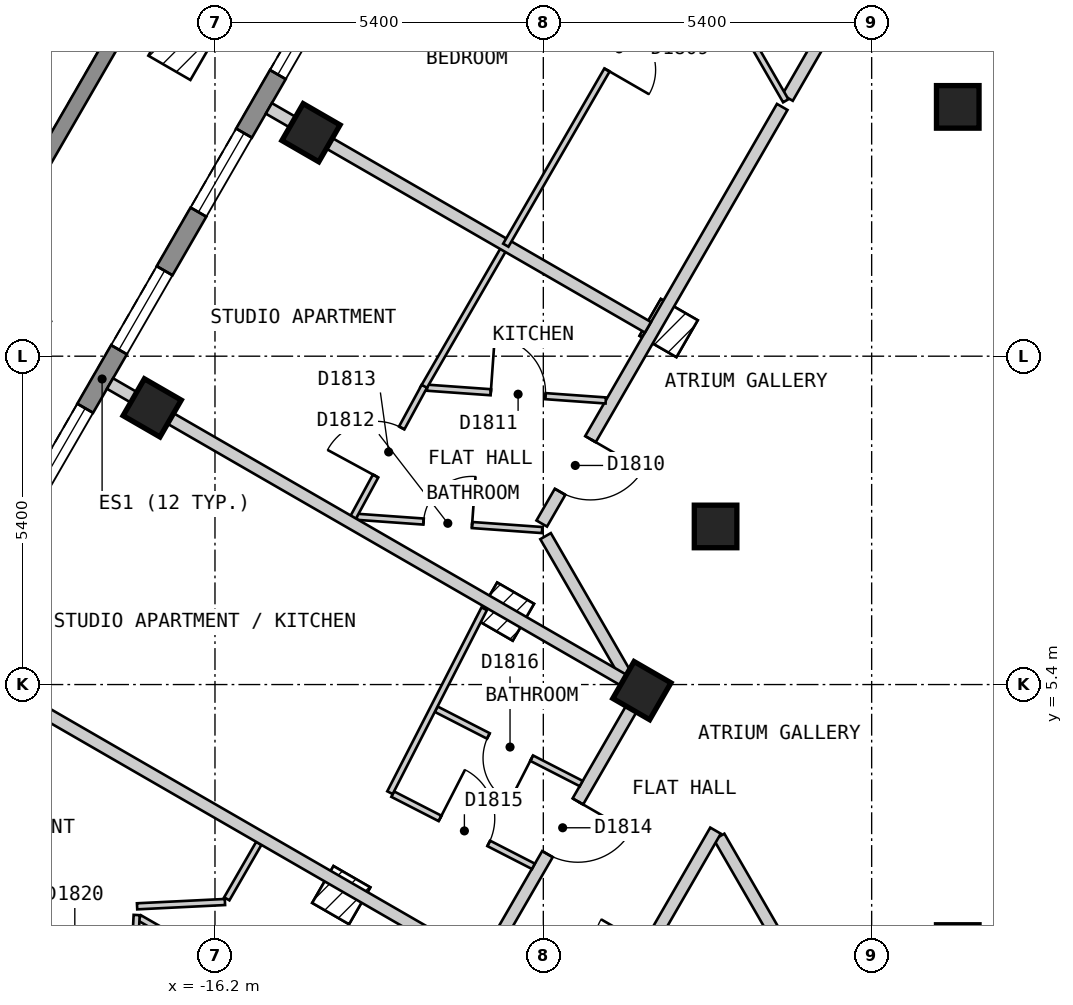
"""IFC4 building model, lengths in metres.
Left out: names, types, materials, properties, quantities, classifications, styles, units other than length and angle.
Written with IfcOpenShell. Run it as: python <this file> out.ifc"""

import sys

from ifc_helpers import new_model, si_unit, direction, frame, frame_2d, origin, origin_2d, place, context, subcontext, project, spatial, polyline, rectangle, outline, extrude, element, fill, save


model = new_model("IFC4")
c1 = context("Model", 3, precision=1e-05, world=origin(), true_north=direction((0.0, 1.0)))
c2 = subcontext(c1, "Body", "Model", "MODEL_VIEW")
j1 = project(units=[si_unit("LENGTHUNIT", "METRE"), si_unit("PLANEANGLEUNIT", "RADIAN")], contexts=[c1])
p1 = place(None, origin())
s1 = spatial("IfcSite", under=j1, at=p1, CompositionType="ELEMENT")
p2 = place(p1, origin())
s2 = spatial("IfcBuilding", under=s1, at=p2, CompositionType="ELEMENT")
p3 = place(p2, frame((0.0, 0.0, 202.8)))
s3 = spatial("IfcBuildingStorey", under=s2, at=p3, CompositionType="ELEMENT", Elevation=202.8)
for number, where, z_axis, x_axis in (
    (1, (-14.621, 14.475, 0.0), (0.0, 0.0, 1.0), (-0.5, -0.866, 0.0)),
    (2, (-17.233, 9.95, 0.0), (0.0, 0.0, 1.0), (-0.5, -0.866, 0.0)),
    (3, (-3.984, 14.9, 0.0), (0.0, 0.0, 1.0), (1.0, 0.0, 0.0)),
    (4, (-7.967, 8.0, 0.0), (0.0, 0.0, 1.0), (1.0, 0.0, 0.0)),
    (5, (-9.179, 5.3, 0.0), (0.0, 0.0, 1.0), (-0.5, -0.866, 0.0)),
):
    element("IfcColumn", number, at=place(p3, frame(where, z_axis=z_axis, x_axis=x_axis)), inside=s3, PredefinedType="COLUMN", context=c2, shape_type="SweptSolid", body=[
        extrude(rectangle(XDim=0.7, YDim=0.7, at=origin_2d()), origin(), (0.0, 0.0, 1.0), 3.0),
    ])
p4 = place(p3, frame((-12.514, 20.025, 0.0), z_axis=(0.0, 0.0, 1.0), x_axis=(-0.500003656944, -0.866023292436, 0.0)))
e6 = element("IfcWall", 6, at=p4, inside=s3, PredefinedType="SOLIDWALL", context=c2, shape_type="SweptSolid", body=[
    extrude(outline(polyline([(0.0, -0.15), (22.17, -0.15), (22.09, 0.15), (0.08, 0.15), (0.0, -0.15)])), origin(), (0.0, 0.0, 1.0), 2.7),
])
p5 = place(p4, frame((1.191, 0.0, 0.15)))
e7 = element("IfcOpeningElement", 7, at=p5, cuts=e6, PredefinedType="OPENING", context=c2, shape_type="SweptSolid", body=[
    extrude(rectangle(XDim=1.5, YDim=2.1, at=frame_2d((0.75, 1.05))), frame((0.0, 0.16, 0.0), z_axis=(0.0, -1.0, 0.0), x_axis=(1.0, 0.0, 0.0)), (0.0, 0.0, 1.0), 0.32),
])
p6 = place(p4, frame((3.804, 0.0, 0.15)))
e8 = element("IfcOpeningElement", 8, at=p6, cuts=e6, PredefinedType="OPENING", context=c2, shape_type="SweptSolid", body=[
    extrude(rectangle(XDim=1.5, YDim=2.1, at=frame_2d((0.75, 1.05))), frame((0.0, 0.16, 0.0), z_axis=(0.0, -1.0, 0.0), x_axis=(1.0, 0.0, 0.0)), (0.0, 0.0, 1.0), 0.32),
])
p7 = place(p4, frame((6.416, 0.0, 0.15)))
e9 = element("IfcOpeningElement", 9, at=p7, cuts=e6, PredefinedType="OPENING", context=c2, shape_type="SweptSolid", body=[
    extrude(rectangle(XDim=1.5, YDim=2.1, at=frame_2d((0.75, 1.05))), frame((0.0, 0.16, 0.0), z_axis=(0.0, -1.0, 0.0), x_axis=(1.0, 0.0, 0.0)), (0.0, 0.0, 1.0), 0.32),
])
p8 = place(p4, frame((9.029, 0.0, 0.15)))
e10 = element("IfcOpeningElement", 10, at=p8, cuts=e6, PredefinedType="OPENING", context=c2, shape_type="SweptSolid", body=[
    extrude(rectangle(XDim=1.5, YDim=2.1, at=frame_2d((0.75, 1.05))), frame((0.0, 0.16, 0.0), z_axis=(0.0, -1.0, 0.0), x_axis=(1.0, 0.0, 0.0)), (0.0, 0.0, 1.0), 0.32),
])
p9 = place(p4, frame((11.641, 0.0, 0.15)))
e11 = element("IfcOpeningElement", 11, at=p9, cuts=e6, PredefinedType="OPENING", context=c2, shape_type="SweptSolid", body=[
    extrude(rectangle(XDim=1.5, YDim=2.1, at=frame_2d((0.75, 1.05))), frame((0.0, 0.16, 0.0), z_axis=(0.0, -1.0, 0.0), x_axis=(1.0, 0.0, 0.0)), (0.0, 0.0, 1.0), 0.32),
])
p10 = place(p4, frame((14.254, 0.0, 0.15)))
e12 = element("IfcOpeningElement", 12, at=p10, cuts=e6, PredefinedType="OPENING", context=c2, shape_type="SweptSolid", body=[
    extrude(rectangle(XDim=1.5, YDim=2.1, at=frame_2d((0.75, 1.05))), frame((0.0, 0.16, 0.0), z_axis=(0.0, -1.0, 0.0), x_axis=(1.0, 0.0, 0.0)), (0.0, 0.0, 1.0), 0.32),
])
p11 = place(p4, frame((16.866, 0.0, 0.15)))
e13 = element("IfcOpeningElement", 13, at=p11, cuts=e6, PredefinedType="OPENING", context=c2, shape_type="SweptSolid", body=[
    extrude(rectangle(XDim=1.5, YDim=2.1, at=frame_2d((0.75, 1.05))), frame((0.0, 0.16, 0.0), z_axis=(0.0, -1.0, 0.0), x_axis=(1.0, 0.0, 0.0)), (0.0, 0.0, 1.0), 0.32),
])
p12 = place(p4, frame((19.479, 0.0, 0.15)))
e14 = element("IfcOpeningElement", 14, at=p12, cuts=e6, PredefinedType="OPENING", context=c2, shape_type="SweptSolid", body=[
    extrude(rectangle(XDim=1.5, YDim=2.1, at=frame_2d((0.75, 1.05))), frame((0.0, 0.16, 0.0), z_axis=(0.0, -1.0, 0.0), x_axis=(1.0, 0.0, 0.0)), (0.0, 0.0, 1.0), 0.32),
])
p13 = place(p3, frame((-26.046, 1.838, 0.0), z_axis=(0.0, 0.0, 1.0), x_axis=(0.500061067893, 0.865990143349, 0.0)))
e15 = element("IfcWall", 15, at=p13, inside=s3, PredefinedType="PARAPET", context=c2, shape_type="SweptSolid", body=[
    extrude(outline(polyline([(0.067, -0.125), (22.796, -0.125), (22.863, 0.125), (0.0, 0.125), (0.067, -0.125)])), origin(), (0.0, 0.0, 1.0), 1.6),
])
p14 = place(p3, frame((-10.763, 7.841, 0.0), z_axis=(0.0, 0.0, 1.0), x_axis=(0.499980792466, -0.866036492975, 0.0)))
e16 = element("IfcWall", 16, at=p14, inside=s3, PredefinedType="PARTITIONING", context=c2, shape_type="SweptSolid", body=[
    extrude(rectangle(XDim=2.618, YDim=0.2, at=frame_2d((1.309, 0.0))), origin(), (0.0, 0.0, 1.0), 2.7),
])
p15 = place(p3, frame((-7.909, 2.898, 0.0), z_axis=(0.0, 0.0, 1.0), x_axis=(0.50019444547, -0.865913111531, 0.0)))
e17 = element("IfcWall", 17, at=p15, inside=s3, PredefinedType="PARTITIONING", context=c2, shape_type="SweptSolid", body=[
    extrude(rectangle(XDim=1.761, YDim=0.2, at=frame_2d((0.88, 0.0))), origin(), (0.0, 0.0, 1.0), 2.7),
])
p16 = place(p3, frame((-10.623, -1.6, 0.0), z_axis=(0.0, 0.0, 1.0), x_axis=(0.500040865889, 0.866001808567, 0.0)))
e18 = element("IfcWall", 18, at=p16, inside=s3, PredefinedType="PARTITIONING", context=c2, shape_type="SweptSolid", body=[
    extrude(rectangle(XDim=5.31, YDim=0.2, at=frame_2d((2.655, 0.0))), origin(), (0.0, 0.0, 1.0), 2.7),
])
p17 = place(p16, frame((2.205, 0.0, 0.0)))
e19 = element("IfcOpeningElement", 19, at=p17, cuts=e18, PredefinedType="OPENING", context=c2, shape_type="SweptSolid", body=[
    extrude(rectangle(XDim=0.9, YDim=2.1, at=frame_2d((0.45, 1.05))), frame((0.0, 0.11, 0.0), z_axis=(0.0, -1.0, 0.0), x_axis=(1.0, 0.0, 0.0)), (0.0, 0.0, 1.0), 0.22),
])
p18 = place(p3, frame((-13.106, -1.5, 0.0), z_axis=(0.0, 0.0, 1.0), x_axis=(0.500025705601, 0.86601056214, 0.0)))
e20 = element("IfcWall", 20, at=p18, inside=s3, PredefinedType="PARTITIONING", context=c2, shape_type="SweptSolid", body=[
    extrude(rectangle(XDim=7.735, YDim=0.2, at=frame_2d((3.868, 0.0))), origin(), (0.0, 0.0, 1.0), 2.7),
])
p19 = place(p18, frame((4.748, 0.0, 0.0)))
e21 = element("IfcOpeningElement", 21, at=p19, cuts=e20, PredefinedType="OPENING", context=c2, shape_type="SweptSolid", body=[
    extrude(rectangle(XDim=1.0, YDim=2.1, at=frame_2d((0.5, 1.05))), frame((0.0, 0.11, 0.0), z_axis=(0.0, -1.0, 0.0), x_axis=(1.0, 0.0, 0.0)), (0.0, 0.0, 1.0), 0.22),
])
p20 = place(p18, frame((0.03, 0.0, 0.0)))
e22 = element("IfcOpeningElement", 22, at=p20, cuts=e20, PredefinedType="OPENING", context=c2, shape_type="SweptSolid", body=[
    extrude(rectangle(XDim=0.8, YDim=2.1, at=frame_2d((0.4, 1.05))), frame((0.0, 0.11, 0.0), z_axis=(0.0, -1.0, 0.0), x_axis=(1.0, 0.0, 0.0)), (0.0, 0.0, 1.0), 0.22),
])
p21 = place(p3, frame((-10.826, 8.048, 0.0), z_axis=(0.0, 0.0, 1.0), x_axis=(0.499953104851, 0.866052477019, 0.0)))
e23 = element("IfcWall", 23, at=p21, inside=s3, PredefinedType="PARTITIONING", context=c2, shape_type="SweptSolid", body=[
    extrude(rectangle(XDim=7.91, YDim=0.2, at=frame_2d((3.955, 0.0))), origin(), (0.0, 0.0, 1.0), 2.7),
])
p22 = place(p21, frame((0.603, 0.0, 0.0)))
e24 = element("IfcOpeningElement", 24, at=p22, cuts=e23, PredefinedType="OPENING", context=c2, shape_type="SweptSolid", body=[
    extrude(rectangle(XDim=1.0, YDim=2.1, at=frame_2d((0.5, 1.05))), frame((0.0, 0.11, 0.0), z_axis=(0.0, -1.0, 0.0), x_axis=(1.0, 0.0, 0.0)), (0.0, 0.0, 1.0), 0.22),
])
p23 = place(p3, frame((-6.784, 15.05, 0.0), z_axis=(0.0, 0.0, 1.0), x_axis=(0.500067724834, 0.865986299303, 0.0)))
e25 = element("IfcWall", 25, at=p23, inside=s3, PredefinedType="PARTITIONING", context=c2, shape_type="SweptSolid", body=[
    extrude(rectangle(XDim=2.713, YDim=0.2, at=frame_2d((1.357, 0.0))), origin(), (0.0, 0.0, 1.0), 2.7),
])
p24 = place(p3, frame((-7.628, 16.412, 0.0), z_axis=(0.0, 0.0, 1.0), x_axis=(0.499843439945, -0.866115774908, 0.0)))
e26 = element("IfcWall", 26, at=p24, inside=s3, PredefinedType="PARTITIONING", context=c2, shape_type="SweptSolid", body=[
    extrude(rectangle(XDim=1.63, YDim=0.1, at=frame_2d((0.815, 0.0))), origin(), (0.0, 0.0, 1.0), 2.7),
])
p25 = place(p3, frame((-12.562, 4.995, 0.0), z_axis=(0.0, 0.0, 1.0), x_axis=(0.889807979554, -0.456335139478, 0.0)))
e27 = element("IfcWall", 27, at=p25, inside=s3, PredefinedType="PARTITIONING", context=c2, shape_type="SweptSolid", body=[
    extrude(rectangle(XDim=2.68, YDim=0.1, at=frame_2d((1.34, 0.0))), origin(), (0.0, 0.0, 1.0), 2.7),
])
p26 = place(p25, frame((0.965, 0.0, 0.0)))
e28 = element("IfcOpeningElement", 28, at=p26, cuts=e27, PredefinedType="OPENING", context=c2, shape_type="SweptSolid", body=[
    extrude(rectangle(XDim=0.8, YDim=2.1, at=frame_2d((0.4, 1.05))), frame((0.0, 0.06, 0.0), z_axis=(0.0, -1.0, 0.0), x_axis=(1.0, 0.0, 0.0)), (0.0, 0.0, 1.0), 0.12),
])
p27 = place(p3, frame((-13.277, 3.598, 0.0), z_axis=(0.0, 0.0, 1.0), x_axis=(0.889780322893, -0.456389063182, 0.0)))
e29 = element("IfcWall", 29, at=p27, inside=s3, PredefinedType="PARTITIONING", context=c2, shape_type="SweptSolid", body=[
    extrude(rectangle(XDim=2.601, YDim=0.1, at=frame_2d((1.3, 0.0))), origin(), (0.0, 0.0, 1.0), 2.7),
])
p28 = place(p27, frame((0.875, 0.0, 0.0)))
e30 = element("IfcOpeningElement", 30, at=p28, cuts=e29, PredefinedType="OPENING", context=c2, shape_type="SweptSolid", body=[
    extrude(rectangle(XDim=0.9, YDim=2.1, at=frame_2d((0.45, 1.05))), frame((0.0, 0.06, 0.0), z_axis=(0.0, -1.0, 0.0), x_axis=(1.0, 0.0, 0.0)), (0.0, 0.0, 1.0), 0.12),
])
p29 = place(p3, frame((-17.441, 1.562, 0.0), z_axis=(0.0, 0.0, 1.0), x_axis=(0.867419073464, -0.497578286293, 0.0)))
e31 = element("IfcWall", 31, at=p29, inside=s3, PredefinedType="PARTITIONING", context=c2, shape_type="SweptSolid", body=[
    extrude(rectangle(XDim=5.185, YDim=0.1, at=frame_2d((2.593, 0.0))), origin(), (0.0, 0.0, 1.0), 2.7),
])
p30 = place(p29, frame((2.165, 0.0, 0.0)))
e32 = element("IfcOpeningElement", 32, at=p30, cuts=e31, PredefinedType="OPENING", context=c2, shape_type="SweptSolid", body=[
    extrude(rectangle(XDim=0.9, YDim=2.1, at=frame_2d((0.45, 1.05))), frame((0.0, 0.06, 0.0), z_axis=(0.0, -1.0, 0.0), x_axis=(1.0, 0.0, 0.0)), (0.0, 0.0, 1.0), 0.12),
])
p31 = place(p3, frame((-13.866, 8.159, 0.0), z_axis=(0.0, 0.0, 1.0), x_axis=(0.9974481372, -0.071394772886, 0.0)))
e33 = element("IfcWall", 33, at=p31, inside=s3, PredefinedType="PARTITIONING", context=c2, shape_type="SweptSolid", body=[
    extrude(rectangle(XDim=3.054, YDim=0.1, at=frame_2d((1.527, 0.0))), origin(), (0.0, 0.0, 1.0), 2.7),
])
p32 = place(p31, frame((1.099, 0.0, 0.0)))
e34 = element("IfcOpeningElement", 34, at=p32, cuts=e33, PredefinedType="OPENING", context=c2, shape_type="SweptSolid", body=[
    extrude(rectangle(XDim=0.8, YDim=2.1, at=frame_2d((0.4, 1.05))), frame((0.0, 0.06, 0.0), z_axis=(0.0, -1.0, 0.0), x_axis=(1.0, 0.0, 0.0)), (0.0, 0.0, 1.0), 0.12),
])
p33 = place(p3, frame((-12.712, 10.282, 0.0), z_axis=(0.0, 0.0, 1.0), x_axis=(0.997457858552, -0.071258826911, 0.0)))
e35 = element("IfcWall", 35, at=p33, inside=s3, PredefinedType="PARTITIONING", context=c2, shape_type="SweptSolid", body=[
    extrude(rectangle(XDim=2.947, YDim=0.1, at=frame_2d((1.473, 0.0))), origin(), (0.0, 0.0, 1.0), 2.7),
])
p34 = place(p33, frame((1.051, 0.0, 0.0)))
e36 = element("IfcOpeningElement", 36, at=p34, cuts=e35, PredefinedType="OPENING", context=c2, shape_type="SweptSolid", body=[
    extrude(rectangle(XDim=0.9, YDim=2.1, at=frame_2d((0.45, 1.05))), frame((0.0, 0.06, 0.0), z_axis=(0.0, -1.0, 0.0), x_axis=(1.0, 0.0, 0.0)), (0.0, 0.0, 1.0), 0.12),
])
p35 = place(p3, frame((-16.006, 1.876, 0.0), z_axis=(0.0, 0.0, 1.0), x_axis=(0.499949632511, 0.866054481515, 0.0)))
e37 = element("IfcWall", 37, at=p35, inside=s3, PredefinedType="PARTITIONING", context=c2, shape_type="SweptSolid", body=[
    extrude(rectangle(XDim=1.054, YDim=0.1, at=frame_2d((0.527, 0.0))), origin(), (0.0, 0.0, 1.0), 2.7),
])
p36 = place(p3, frame((-12.778, 10.268, 0.0), z_axis=(0.0, 0.0, 1.0), x_axis=(0.500084799062, 0.865976439487, 0.0)))
e38 = element("IfcWall", 38, at=p36, inside=s3, PredefinedType="PARTITIONING", context=c2, shape_type="SweptSolid", body=[
    extrude(rectangle(XDim=2.722, YDim=0.1, at=frame_2d((1.361, 0.0))), origin(), (0.0, 0.0, 1.0), 2.7),
])
p37 = place(p3, frame((-13.93, 8.145, 0.0), z_axis=(0.0, 0.0, 1.0), x_axis=(0.477194887681, 0.878797496111, 0.0)))
e39 = element("IfcWall", 39, at=p37, inside=s3, PredefinedType="PARTITIONING", context=c2, shape_type="SweptSolid", body=[
    extrude(rectangle(XDim=2.458, YDim=0.1, at=frame_2d((1.229, 0.0))), origin(), (0.0, 0.0, 1.0), 2.7),
])
p38 = place(p37, frame((0.779, 0.0, 0.0)))
e40 = element("IfcOpeningElement", 40, at=p38, cuts=e39, PredefinedType="OPENING", context=c2, shape_type="SweptSolid", body=[
    extrude(rectangle(XDim=0.9, YDim=2.1, at=frame_2d((0.45, 1.05))), frame((0.0, 0.06, 0.0), z_axis=(0.0, -1.0, 0.0), x_axis=(1.0, 0.0, 0.0)), (0.0, 0.0, 1.0), 0.12),
])
p39 = place(p3, frame((-13.322, 3.622, 0.0), z_axis=(0.0, 0.0, 1.0), x_axis=(0.456157649007, 0.889898982611, 0.0)))
e41 = element("IfcWall", 41, at=p39, inside=s3, PredefinedType="PARTITIONING", context=c2, shape_type="SweptSolid", body=[
    extrude(rectangle(XDim=3.398, YDim=0.1, at=frame_2d((1.699, 0.0))), origin(), (0.0, 0.0, 1.0), 2.7),
])
p40 = place(p3, frame((-17.503, 1.307, 0.0), z_axis=(0.0, 0.0, 1.0), x_axis=(0.049055201451, 0.99879606888, 0.0)))
e42 = element("IfcWall", 42, at=p40, inside=s3, PredefinedType="PARTITIONING", context=c2, shape_type="SweptSolid", body=[
    extrude(rectangle(XDim=0.303, YDim=0.1, at=frame_2d((0.152, 0.0))), origin(), (0.0, 0.0, 1.0), 2.7),
])
p41 = place(p3, frame((-17.481, 1.753, 0.0), z_axis=(0.0, 0.0, 1.0), x_axis=(0.998793651238, 0.049104401505, 0.0)))
e43 = element("IfcWall", 43, at=p41, inside=s3, PredefinedType="PARTITIONING", context=c2, shape_type="SweptSolid", body=[
    extrude(rectangle(XDim=1.447, YDim=0.1, at=frame_2d((0.723, 0.0))), origin(), (0.0, 0.0, 1.0), 2.7),
])
p42 = place(p3, frame((-20.539, 5.825, 0.0), z_axis=(0.0, 0.0, 1.0), x_axis=(0.866028187226, -0.499995178908, 0.0)))
e44 = element("IfcWall", 44, at=p42, inside=s3, PredefinedType="PARTITIONING", context=c2, shape_type="SweptSolid", body=[
    extrude(rectangle(XDim=9.996, YDim=0.2, at=frame_2d((4.998, 0.0))), origin(), (0.0, 0.0, 1.0), 2.7),
])
p43 = place(p3, frame((-17.926, 10.35, 0.0), z_axis=(0.0, 0.0, 1.0), x_axis=(0.866018411306, -0.500012111133, 0.0)))
e45 = element("IfcWall", 45, at=p43, inside=s3, PredefinedType="PARTITIONING", context=c2, shape_type="SweptSolid", body=[
    extrude(rectangle(XDim=9.898, YDim=0.2, at=frame_2d((4.949, 0.0))), origin(), (0.0, 0.0, 1.0), 2.7),
])
p44 = place(p3, frame((-15.314, 14.875, 0.0), z_axis=(0.0, 0.0, 1.0), x_axis=(0.866001485781, -0.500041424909, 0.0)))
e46 = element("IfcWall", 46, at=p44, inside=s3, PredefinedType="PARTITIONING", context=c2, shape_type="SweptSolid", body=[
    extrude(rectangle(XDim=7.2, YDim=0.2, at=frame_2d((3.6, 0.0))), origin(), (0.0, 0.0, 1.0), 2.7),
])
p45 = place(p3, frame((-11.417, 12.625, 0.0), z_axis=(0.0, 0.0, 1.0), x_axis=(0.500007885066, 0.866020851292, 0.0)))
e47 = element("IfcWall", 47, at=p45, inside=s3, PredefinedType="PARTITIONING", context=c2, shape_type="SweptSolid", body=[
    extrude(rectangle(XDim=7.33, YDim=0.1, at=frame_2d((3.665, 0.0))), origin(), (0.0, 0.0, 1.0), 2.7),
])
p46 = place(p45, frame((3.328, 0.0, 0.0)))
e48 = element("IfcOpeningElement", 48, at=p46, cuts=e47, PredefinedType="OPENING", context=c2, shape_type="SweptSolid", body=[
    extrude(rectangle(XDim=0.8, YDim=2.1, at=frame_2d((0.4, 1.05))), frame((0.0, 0.06, 0.0), z_axis=(0.0, -1.0, 0.0), x_axis=(1.0, 0.0, 0.0)), (0.0, 0.0, 1.0), 0.12),
])
p47 = place(p6, origin())
e49 = element("IfcWindow", 49, at=p47, inside=s3, PartitioningType="SINGLE_PANEL", PredefinedType="WINDOW", context=c2, shape_type="SweptSolid", body=[
    extrude(rectangle(XDim=1.5, YDim=2.1, at=frame_2d((0.75, 1.05))), frame((0.0, 0.03, 0.0), z_axis=(0.0, -1.0, 0.0), x_axis=(1.0, 0.0, 0.0)), (0.0, 0.0, 1.0), 0.06),
])
fill(e8, e49)
p48 = place(p7, origin())
e50 = element("IfcWindow", 50, at=p48, inside=s3, PartitioningType="SINGLE_PANEL", PredefinedType="WINDOW", context=c2, shape_type="SweptSolid", body=[
    extrude(rectangle(XDim=1.5, YDim=2.1, at=frame_2d((0.75, 1.05))), frame((0.0, 0.03, 0.0), z_axis=(0.0, -1.0, 0.0), x_axis=(1.0, 0.0, 0.0)), (0.0, 0.0, 1.0), 0.06),
])
fill(e9, e50)
p49 = place(p8, origin())
e51 = element("IfcWindow", 51, at=p49, inside=s3, PartitioningType="SINGLE_PANEL", PredefinedType="WINDOW", context=c2, shape_type="SweptSolid", body=[
    extrude(rectangle(XDim=1.5, YDim=2.1, at=frame_2d((0.75, 1.05))), frame((0.0, 0.03, 0.0), z_axis=(0.0, -1.0, 0.0), x_axis=(1.0, 0.0, 0.0)), (0.0, 0.0, 1.0), 0.06),
])
fill(e10, e51)
p50 = place(p9, origin())
e52 = element("IfcWindow", 52, at=p50, inside=s3, PartitioningType="SINGLE_PANEL", PredefinedType="WINDOW", context=c2, shape_type="SweptSolid", body=[
    extrude(rectangle(XDim=1.5, YDim=2.1, at=frame_2d((0.75, 1.05))), frame((0.0, 0.03, 0.0), z_axis=(0.0, -1.0, 0.0), x_axis=(1.0, 0.0, 0.0)), (0.0, 0.0, 1.0), 0.06),
])
fill(e11, e52)
p51 = place(p46, origin())
e53 = element("IfcDoor", 53, at=p51, inside=s3, OperationType="SINGLE_SWING_LEFT", PredefinedType="DOOR", context=c2, shape_type="SweptSolid", body=[
    extrude(rectangle(XDim=0.8, YDim=2.1, at=frame_2d((0.4, 1.05))), frame((0.0, 0.025, 0.0), z_axis=(0.0, -1.0, 0.0), x_axis=(1.0, 0.0, 0.0)), (0.0, 0.0, 1.0), 0.05),
])
fill(e48, e53)
p52 = place(p22, origin())
e54 = element("IfcDoor", 54, at=p52, inside=s3, OperationType="SINGLE_SWING_RIGHT", PredefinedType="DOOR", context=c2, shape_type="SweptSolid", body=[
    extrude(rectangle(XDim=1.0, YDim=2.1, at=frame_2d((0.5, 1.05))), frame((0.0, 0.025, 0.0), z_axis=(0.0, -1.0, 0.0), x_axis=(1.0, 0.0, 0.0)), (0.0, 0.0, 1.0), 0.05),
])
fill(e24, e54)
p53 = place(p34, origin())
e55 = element("IfcDoor", 55, at=p53, inside=s3, OperationType="SINGLE_SWING_LEFT", PredefinedType="DOOR", context=c2, shape_type="SweptSolid", body=[
    extrude(rectangle(XDim=0.9, YDim=2.1, at=frame_2d((0.45, 1.05))), frame((0.0, 0.025, 0.0), z_axis=(0.0, -1.0, 0.0), x_axis=(1.0, 0.0, 0.0)), (0.0, 0.0, 1.0), 0.05),
])
fill(e36, e55)
p54 = place(p32, origin())
e56 = element("IfcDoor", 56, at=p54, inside=s3, OperationType="SINGLE_SWING_RIGHT", PredefinedType="DOOR", context=c2, shape_type="SweptSolid", body=[
    extrude(rectangle(XDim=0.8, YDim=2.1, at=frame_2d((0.4, 1.05))), frame((0.0, 0.025, 0.0), z_axis=(0.0, -1.0, 0.0), x_axis=(1.0, 0.0, 0.0)), (0.0, 0.0, 1.0), 0.05),
])
fill(e34, e56)
p55 = place(p38, origin())
e57 = element("IfcDoor", 57, at=p55, inside=s3, OperationType="SINGLE_SWING_LEFT", PredefinedType="DOOR", context=c2, shape_type="SweptSolid", body=[
    extrude(rectangle(XDim=0.9, YDim=2.1, at=frame_2d((0.45, 1.05))), frame((0.0, 0.025, 0.0), z_axis=(0.0, -1.0, 0.0), x_axis=(1.0, 0.0, 0.0)), (0.0, 0.0, 1.0), 0.05),
])
fill(e40, e57)
p56 = place(p19, origin())
e58 = element("IfcDoor", 58, at=p56, inside=s3, OperationType="SINGLE_SWING_RIGHT", PredefinedType="DOOR", context=c2, shape_type="SweptSolid", body=[
    extrude(rectangle(XDim=1.0, YDim=2.1, at=frame_2d((0.5, 1.05))), frame((0.0, 0.025, 0.0), z_axis=(0.0, -1.0, 0.0), x_axis=(1.0, 0.0, 0.0)), (0.0, 0.0, 1.0), 0.05),
])
fill(e21, e58)
p57 = place(p28, origin())
e59 = element("IfcDoor", 59, at=p57, inside=s3, OperationType="SINGLE_SWING_LEFT", PredefinedType="DOOR", context=c2, shape_type="SweptSolid", body=[
    extrude(rectangle(XDim=0.9, YDim=2.1, at=frame_2d((0.45, 1.05))), frame((0.0, 0.025, 0.0), z_axis=(0.0, -1.0, 0.0), x_axis=(1.0, 0.0, 0.0)), (0.0, 0.0, 1.0), 0.05),
])
fill(e30, e59)
p58 = place(p26, origin())
e60 = element("IfcDoor", 60, at=p58, inside=s3, OperationType="SINGLE_SWING_RIGHT", PredefinedType="DOOR", context=c2, shape_type="SweptSolid", body=[
    extrude(rectangle(XDim=0.8, YDim=2.1, at=frame_2d((0.4, 1.05))), frame((0.0, 0.025, 0.0), z_axis=(0.0, -1.0, 0.0), x_axis=(1.0, 0.0, 0.0)), (0.0, 0.0, 1.0), 0.05),
])
fill(e28, e60)
save(model, sys.argv[1])
